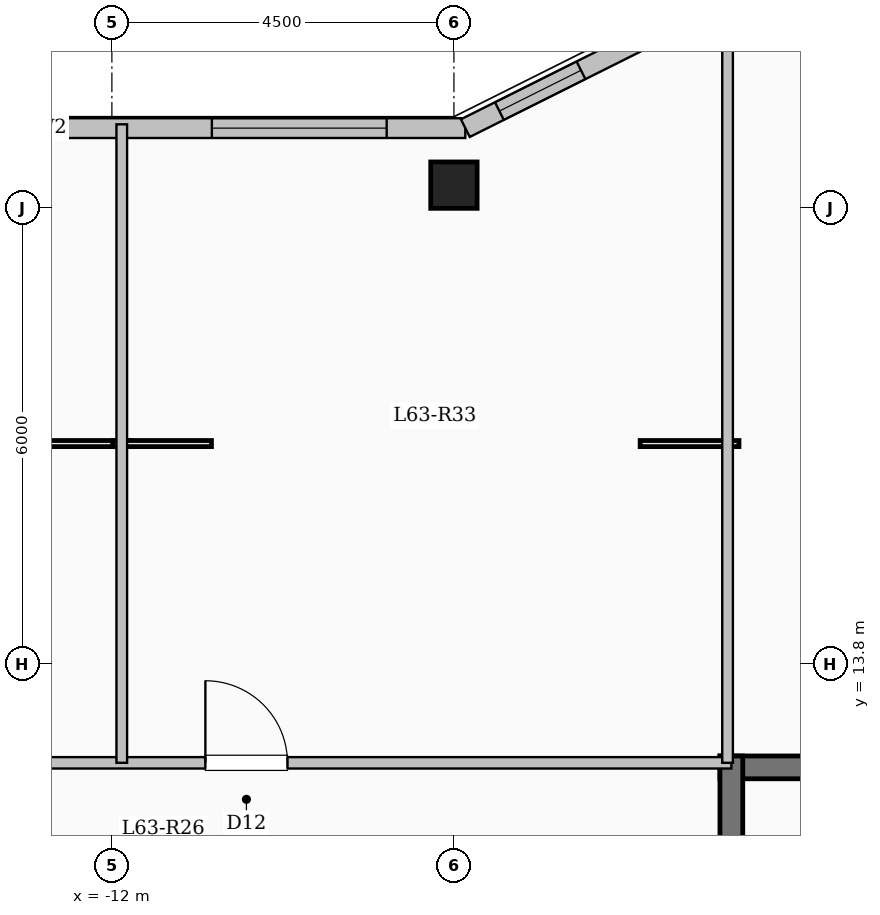
"""IFC4 building model, lengths in metres.
Left out: names, types, materials, properties, quantities, classifications, styles, units other than length and angle.
Written with IfcOpenShell. Run it as: python <this file> out.ifc"""

import sys

from ifc_helpers import new_model, si_unit, direction, frame, frame_2d, origin, origin_2d, place, context, subcontext, project, spatial, rectangle, hollow_circle, extrude, element, fill, save


model = new_model("IFC4")
c1 = context("Model", 3, precision=1e-05, world=origin(), true_north=direction((0.0, 1.0)))
c2 = subcontext(c1, "Body", "Model", "MODEL_VIEW")
j1 = project(units=[si_unit("LENGTHUNIT", "METRE"), si_unit("PLANEANGLEUNIT", "RADIAN")], contexts=[c1])
p1 = place(None, origin())
s1 = spatial("IfcSite", under=j1, at=p1, CompositionType="ELEMENT")
p2 = place(p1, origin())
s2 = spatial("IfcBuilding", under=s1, at=p2, CompositionType="ELEMENT")
p3 = place(p2, frame((0.0, 0.0, 231.75)))
s3 = spatial("IfcBuildingStorey", under=s2, at=p3, CompositionType="ELEMENT", Elevation=231.75)
p4 = place(p3, frame((-7.5, 20.1, 0.0), z_axis=(0.0, 0.0, 1.0), x_axis=(1.0, 0.0, 0.0)))
e1 = element("IfcColumn", 1, at=p4, inside=s3, PredefinedType="COLUMN", context=c2, shape_type="SweptSolid", body=[
    extrude(hollow_circle(Radius=0.305, WallThickness=0.025, at=origin_2d()), origin(), (0.0, 0.0, 1.0), 4.65),
])
p5 = place(p3, frame((-18.45, 20.85, 0.0), z_axis=(0.0, 0.0, 1.0), x_axis=(1.0, 0.0, 0.0)))
e2 = element("IfcWall", 2, at=p5, inside=s3, PredefinedType="SOLIDWALL", context=c2, shape_type="SweptSolid", body=[
    extrude(rectangle(XDim=11.1, YDim=0.26, at=frame_2d((5.55, 0.0))), origin(), (0.0, 0.0, 1.0), 4.35),
])
p6 = place(p5, frame((2.14, 0.0, 0.85)))
e3 = element("IfcOpeningElement", 3, at=p6, cuts=e2, PredefinedType="OPENING", context=c2, shape_type="SweptSolid", body=[
    extrude(rectangle(XDim=2.3, YDim=2.2, at=frame_2d((1.15, 1.1))), frame((0.0, 0.14, 0.0), z_axis=(0.0, -1.0, 0.0), x_axis=(1.0, 0.0, 0.0)), (0.0, 0.0, 1.0), 0.28),
])
p7 = place(p5, frame((7.765, 0.0, 0.85)))
e4 = element("IfcOpeningElement", 4, at=p7, cuts=e2, PredefinedType="OPENING", context=c2, shape_type="SweptSolid", body=[
    extrude(rectangle(XDim=2.3, YDim=2.2, at=frame_2d((1.15, 1.1))), frame((0.0, 0.14, 0.0), z_axis=(0.0, -1.0, 0.0), x_axis=(1.0, 0.0, 0.0)), (0.0, 0.0, 1.0), 0.28),
])
p8 = place(p3, frame((-7.35, 20.85, 0.0), z_axis=(0.0, 0.0, 1.0), x_axis=(0.894427191, 0.4472135955, 0.0)))
e5 = element("IfcWall", 5, at=p8, inside=s3, PredefinedType="SOLIDWALL", context=c2, shape_type="SweptSolid", body=[
    extrude(rectangle(XDim=3.354, YDim=0.26, at=frame_2d((1.677, 0.0))), origin(), (0.0, 0.0, 1.0), 4.35),
])
p9 = place(p8, frame((0.501, 0.0, 0.95)))
e6 = element("IfcOpeningElement", 6, at=p9, cuts=e5, PredefinedType="OPENING", context=c2, shape_type="SweptSolid", body=[
    extrude(rectangle(XDim=1.2, YDim=1.5, at=frame_2d((0.6, 0.75))), frame((0.0, 0.14, 0.0), z_axis=(0.0, -1.0, 0.0), x_axis=(1.0, 0.0, 0.0)), (0.0, 0.0, 1.0), 0.28),
])
p10 = place(p3, frame((-4.0, 12.44, 0.0), z_axis=(0.0, 0.0, 1.0), x_axis=(1.0, 0.0, 0.0)))
e7 = element("IfcWall", 7, at=p10, inside=s3, PredefinedType="SHEAR", context=c2, shape_type="SweptSolid", body=[
    extrude(rectangle(XDim=8.0, YDim=0.3, at=frame_2d((4.0, 0.0))), origin(), (0.0, 0.0, 1.0), 4.65),
])
p11 = place(p3, frame((-3.85, 9.0, 0.0), z_axis=(0.0, 0.0, 1.0), x_axis=(0.0, 1.0, 0.0)))
e8 = element("IfcWall", 8, at=p11, inside=s3, PredefinedType="SHEAR", context=c2, shape_type="SweptSolid", body=[
    extrude(rectangle(XDim=3.59, YDim=0.3, at=frame_2d((1.795, 0.0))), origin(), (0.0, 0.0, 1.0), 4.65),
])
p12 = place(p3, frame((-18.35, 12.5, 0.0), z_axis=(0.0, 0.0, 1.0), x_axis=(1.0, 0.0, 0.0)))
e9 = element("IfcWall", 9, at=p12, inside=s3, PredefinedType="PARTITIONING", context=c2, shape_type="SweptSolid", body=[
    extrude(rectangle(XDim=14.5, YDim=0.15, at=frame_2d((7.25, 0.0))), origin(), (0.0, 0.0, 1.0), 4.35),
])
p13 = place(p12, frame((1.2, 0.0, 0.0)))
e10 = element("IfcOpeningElement", 10, at=p13, cuts=e9, PredefinedType="OPENING", context=c2, shape_type="SweptSolid", body=[
    extrude(rectangle(XDim=1.2, YDim=2.15, at=frame_2d((0.6, 1.075))), frame((0.0, 0.085, 0.0), z_axis=(0.0, -1.0, 0.0), x_axis=(1.0, 0.0, 0.0)), (0.0, 0.0, 1.0), 0.17),
])
p14 = place(p12, frame((7.58, 0.0, 0.0)))
e11 = element("IfcOpeningElement", 11, at=p14, cuts=e9, PredefinedType="OPENING", context=c2, shape_type="SweptSolid", body=[
    extrude(rectangle(XDim=1.08, YDim=2.15, at=frame_2d((0.54, 1.075))), frame((0.0, 0.085, 0.0), z_axis=(0.0, -1.0, 0.0), x_axis=(1.0, 0.0, 0.0)), (0.0, 0.0, 1.0), 0.17),
])
p15 = place(p3, frame((-3.9, 12.5, 0.0), z_axis=(0.0, 0.0, 1.0), x_axis=(0.0, 1.0, 0.0)))
e12 = element("IfcWall", 12, at=p15, inside=s3, PredefinedType="PARTITIONING", context=c2, shape_type="SweptSolid", body=[
    extrude(rectangle(XDim=9.88, YDim=0.14, at=frame_2d((4.94, 0.0))), origin(), (0.0, 0.0, 1.0), 4.35),
])
p16 = place(p3, frame((-11.87, 12.5, 0.0), z_axis=(0.0, 0.0, 1.0), x_axis=(0.0, 1.0, 0.0)))
e13 = element("IfcWall", 13, at=p16, inside=s3, PredefinedType="PARTITIONING", context=c2, shape_type="SweptSolid", body=[
    extrude(rectangle(XDim=8.4, YDim=0.14, at=frame_2d((4.2, 0.0))), origin(), (0.0, 0.0, 1.0), 4.35),
])
p17 = place(p7, origin())
e14 = element("IfcWindow", 14, at=p17, inside=s3, PartitioningType="SINGLE_PANEL", PredefinedType="WINDOW", context=c2, shape_type="SweptSolid", body=[
    extrude(rectangle(XDim=2.3, YDim=2.2, at=frame_2d((1.15, 1.1))), frame((0.0, 0.03, 0.0), z_axis=(0.0, -1.0, 0.0), x_axis=(1.0, 0.0, 0.0)), (0.0, 0.0, 1.0), 0.06),
])
fill(e4, e14)
p18 = place(p9, origin())
e15 = element("IfcWindow", 15, at=p18, inside=s3, PartitioningType="SINGLE_PANEL", PredefinedType="WINDOW", context=c2, shape_type="SweptSolid", body=[
    extrude(rectangle(XDim=1.2, YDim=1.5, at=frame_2d((0.6, 0.75))), frame((0.0, 0.03, 0.0), z_axis=(0.0, -1.0, 0.0), x_axis=(1.0, 0.0, 0.0)), (0.0, 0.0, 1.0), 0.06),
])
fill(e6, e15)
p19 = place(p14, origin())
e16 = element("IfcDoor", 16, at=p19, inside=s3, OperationType="SINGLE_SWING_LEFT", PredefinedType="DOOR", context=c2, shape_type="SweptSolid", body=[
    extrude(rectangle(XDim=1.08, YDim=2.15, at=frame_2d((0.54, 1.075))), frame((0.0, 0.025, 0.0), z_axis=(0.0, -1.0, 0.0), x_axis=(1.0, 0.0, 0.0)), (0.0, 0.0, 1.0), 0.05),
])
fill(e11, e16)
save(model, sys.argv[1])
